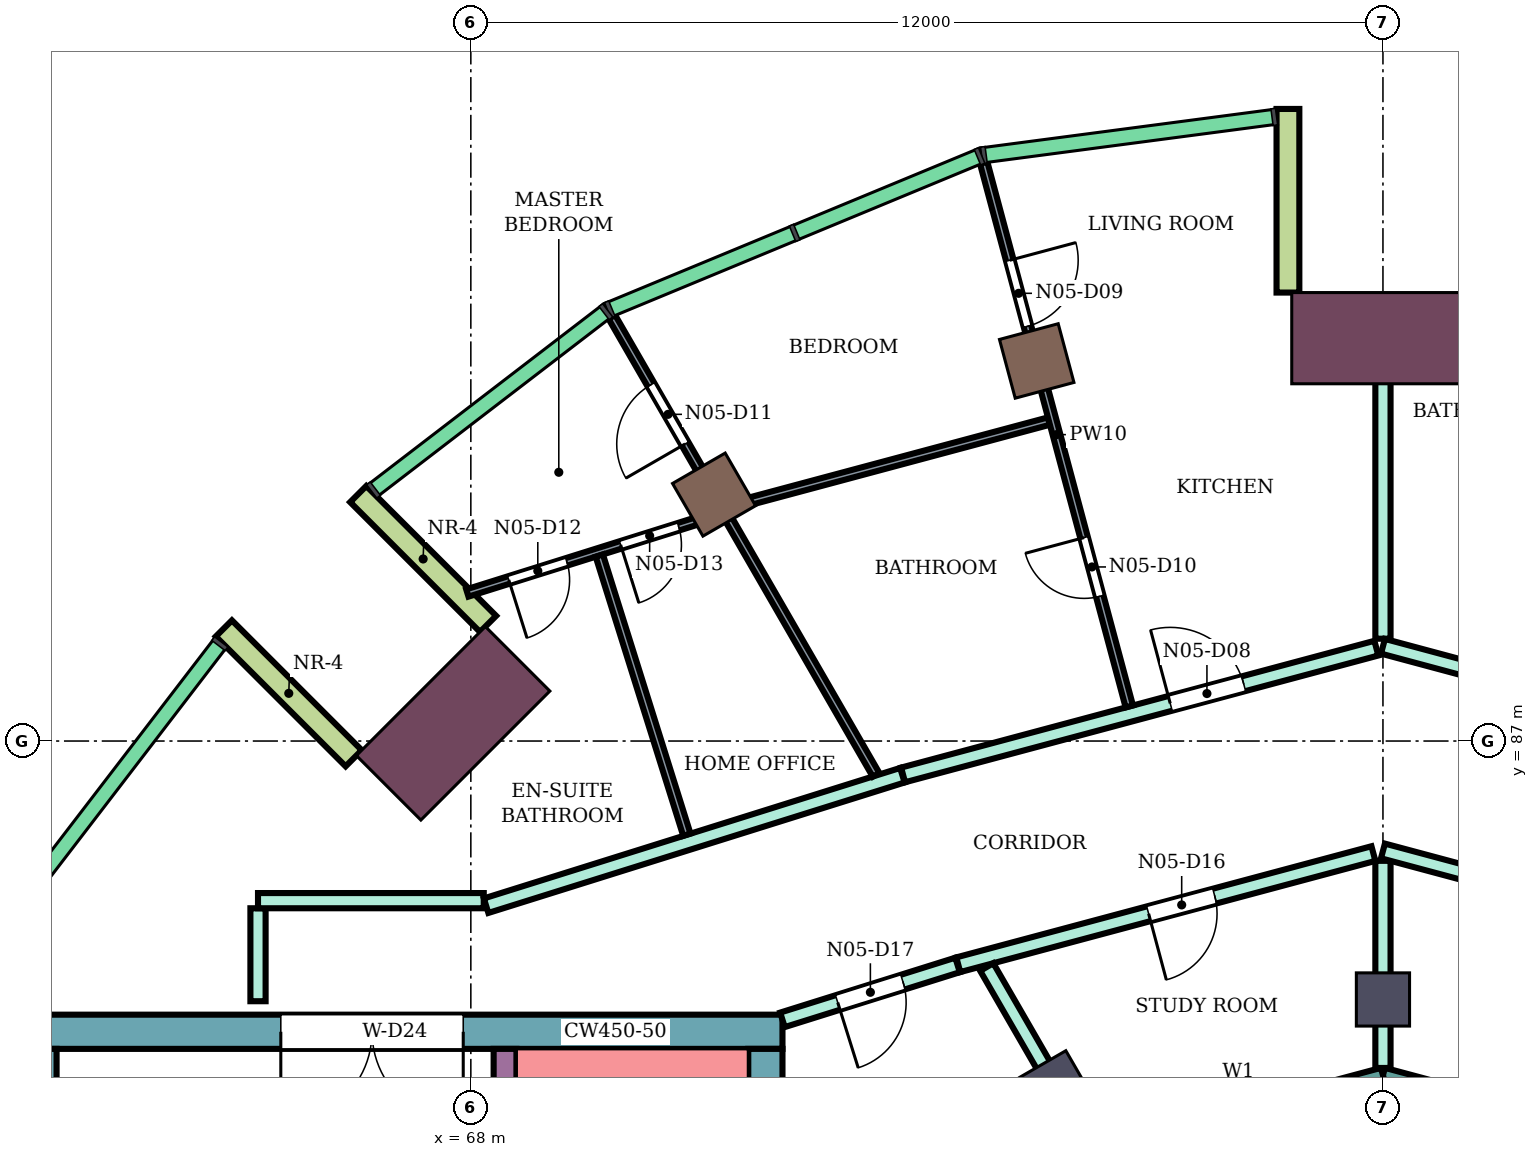
"""IFC4 building model, lengths in metres.
Left out: names, types, materials, properties, quantities, classifications, styles, units other than length and angle.
Written with IfcOpenShell. Run it as: python <this file> out.ifc"""

import sys

from ifc_helpers import new_model, si_unit, direction, frame, frame_2d, origin, origin_2d, place, context, subcontext, project, spatial, rectangle, extrude, element, fill, save


model = new_model("IFC4")
c1 = context("Model", 3, precision=1e-05, world=origin(), true_north=direction((0.0, 1.0)))
c2 = subcontext(c1, "Body", "Model", "MODEL_VIEW")
j1 = project(units=[si_unit("LENGTHUNIT", "METRE"), si_unit("PLANEANGLEUNIT", "RADIAN")], contexts=[c1])
p1 = place(None, origin())
s1 = spatial("IfcSite", under=j1, at=p1, CompositionType="ELEMENT")
p2 = place(p1, origin())
s2 = spatial("IfcBuilding", under=s1, at=p2, CompositionType="ELEMENT")
p3 = place(p2, frame((0.0, 0.0, 319.3)))
s3 = spatial("IfcBuildingStorey", under=s2, at=p3, CompositionType="ELEMENT", Elevation=319.3)
for number, where, z_axis, x_axis in (
    (1, (75.445, 92.0, 0.0), (0.0, 0.0, 1.0), (-0.259, 0.966, 0.0)),
    (2, (71.2, 90.242, 0.0), (0.0, 0.0, 1.0), (-0.5, 0.866, 0.0)),
):
    element("IfcColumn", number, at=place(p3, frame(where, z_axis=z_axis, x_axis=x_axis)), inside=s3, PredefinedType="COLUMN", context=c2, shape_type="SweptSolid", body=[
        extrude(rectangle(XDim=0.8, YDim=0.8, at=origin_2d()), origin(), (0.0, 0.0, 1.0), 4.4),
    ])
for number, where, z_axis, x_axis in (
    (3, (80.0, 83.6, 0.0), (0.0, 0.0, 1.0), (0.0, 1.0, 0.0)),
    (4, (75.7, 82.448, 0.0), (0.0, 0.0, 1.0), (-0.5, 0.866, 0.0)),
):
    element("IfcColumn", number, at=place(p3, frame(where, z_axis=z_axis, x_axis=x_axis)), inside=s3, PredefinedType="COLUMN", context=c2, shape_type="SweptSolid", body=[
        extrude(rectangle(XDim=0.7, YDim=0.7, at=origin_2d()), origin(), (0.0, 0.0, 1.0), 4.4),
    ])
for number, where, z_axis, x_axis in (
    (5, (80.0, 92.3, 0.0), (0.0, 0.0, 1.0), (0.0, 1.0, 0.0)),
    (6, (67.767, 87.233, 0.0), (0.0, 0.0, 1.0), (-0.707, 0.707, 0.0)),
):
    element("IfcColumn", number, at=place(p3, frame(where, z_axis=z_axis, x_axis=x_axis)), inside=s3, PredefinedType="COLUMN", context=c2, shape_type="SweptSolid", body=[
        extrude(rectangle(XDim=1.2, YDim=2.4, at=origin_2d()), origin(), (0.0, 0.0, 1.0), 4.4),
    ])
p4 = place(p3, frame((72.1, 83.175, 0.0), z_axis=(0.0, 0.0, 1.0), x_axis=(-1.0, 0.0, 0.0)))
e7 = element("IfcWall", 7, at=p4, inside=s3, PredefinedType="SHEAR", context=c2, shape_type="SweptSolid", body=[
    extrude(rectangle(XDim=10.0, YDim=0.45, at=frame_2d((5.0, 0.0))), origin(), (0.0, 0.0, 1.0), 4.08),
])
p5 = place(p4, frame((4.2, 0.0, 0.0)))
e8 = element("IfcOpeningElement", 8, at=p5, cuts=e7, PredefinedType="OPENING", context=c2, shape_type="SweptSolid", body=[
    extrude(rectangle(XDim=2.4, YDim=2.4, at=frame_2d((1.2, 1.2))), frame((0.0, 0.235, 0.0), z_axis=(0.0, -1.0, 0.0), x_axis=(1.0, 0.0, 0.0)), (0.0, 0.0, 1.0), 0.47),
])
p6 = place(p3, frame((71.875, 82.95, 0.0), z_axis=(0.0, 0.0, 1.0), x_axis=(0.0, -1.0, 0.0)))
e9 = element("IfcWall", 9, at=p6, inside=s3, PredefinedType="SHEAR", context=c2, shape_type="SweptSolid", body=[
    extrude(rectangle(XDim=7.95, YDim=0.45, at=frame_2d((3.975, 0.0))), origin(), (0.0, 0.0, 1.0), 4.08),
])
p7 = place(p3, frame((62.325, 82.95, 0.0), z_axis=(0.0, 0.0, 1.0), x_axis=(0.0, -1.0, 0.0)))
e10 = element("IfcWall", 10, at=p7, inside=s3, PredefinedType="SHEAR", context=c2, shape_type="SweptSolid", body=[
    extrude(rectangle(XDim=3.7, YDim=0.45, at=frame_2d((1.85, 0.0))), origin(), (0.0, 0.0, 1.0), 4.08),
])
p8 = place(p3, frame((68.45, 82.95, 0.0), z_axis=(0.0, 0.0, 1.0), x_axis=(0.0, -1.0, 0.0)))
e11 = element("IfcWall", 11, at=p8, inside=s3, PredefinedType="SHEAR", context=c2, shape_type="SweptSolid", body=[
    extrude(rectangle(XDim=7.95, YDim=0.3, at=frame_2d((3.975, 0.0))), origin(), (0.0, 0.0, 1.0), 4.08),
])
p9 = place(p8, frame((0.6, 0.0, 0.0)))
e12 = element("IfcOpeningElement", 12, at=p9, cuts=e11, PredefinedType="OPENING", context=c2, shape_type="SweptSolid", body=[
    extrude(rectangle(XDim=0.9, YDim=2.1, at=frame_2d((0.45, 1.05))), frame((0.0, 0.16, 0.0), z_axis=(0.0, -1.0, 0.0), x_axis=(1.0, 0.0, 0.0)), (0.0, 0.0, 1.0), 0.32),
])
for number, where, z_axis, x_axis in (
    (13, (78.75, 92.9, 0.0), (0.0, 0.0, 1.0), (0.0, 1.0, 0.0)),
    (14, (68.227, 88.541, 0.0), (0.0, 0.0, 1.0), (-0.707, 0.707, 0.0)),
    (15, (66.459, 86.773, 0.0), (0.0, 0.0, 1.0), (-0.707, 0.707, 0.0)),
):
    element("IfcWall", number, at=place(p3, frame(where, z_axis=z_axis, x_axis=x_axis)), inside=s3, PredefinedType="NOTDEFINED", context=c2, shape_type="SweptSolid", body=[
        extrude(rectangle(XDim=2.416, YDim=0.3, at=frame_2d((1.208, 0.0))), origin(), (0.0, 0.0, 1.0), 4.4),
    ])
p10 = place(p3, frame((83.802, 81.585, 0.0), z_axis=(0.0, 0.0, 1.0), x_axis=(-0.965933654434, 0.258789828301, 0.0)))
e16 = element("IfcWall", 16, at=p10, inside=s3, PredefinedType="NOTDEFINED", context=c2, shape_type="SweptSolid", body=[
    extrude(rectangle(XDim=3.936, YDim=0.2, at=frame_2d((1.968, 0.0))), origin(), (0.0, 0.0, 1.0), 4.4),
])
p11 = place(p10, frame((0.468, 0.0, 0.9)))
e17 = element("IfcOpeningElement", 17, at=p11, cuts=e16, PredefinedType="OPENING", context=c2, shape_type="SweptSolid", body=[
    extrude(rectangle(XDim=3.0, YDim=2.3, at=frame_2d((1.5, 1.15))), frame((0.0, 0.11, 0.0), z_axis=(0.0, -1.0, 0.0), x_axis=(1.0, 0.0, 0.0)), (0.0, 0.0, 1.0), 0.22),
])
p12 = place(p3, frame((80.0, 82.604, 0.0), z_axis=(0.0, 0.0, 1.0), x_axis=(-0.965933654434, -0.258789828301, 0.0)))
e18 = element("IfcWall", 18, at=p12, inside=s3, PredefinedType="NOTDEFINED", context=c2, shape_type="SweptSolid", body=[
    extrude(rectangle(XDim=3.936, YDim=0.2, at=frame_2d((1.968, 0.0))), origin(), (0.0, 0.0, 1.0), 4.4),
])
p13 = place(p12, frame((0.468, 0.0, 0.9)))
e19 = element("IfcOpeningElement", 19, at=p13, cuts=e18, PredefinedType="OPENING", context=c2, shape_type="SweptSolid", body=[
    extrude(rectangle(XDim=3.0, YDim=2.3, at=frame_2d((1.5, 1.15))), frame((0.0, 0.11, 0.0), z_axis=(0.0, -1.0, 0.0), x_axis=(1.0, 0.0, 0.0)), (0.0, 0.0, 1.0), 0.22),
])
p14 = place(p3, frame((65.2, 83.577, 0.0), z_axis=(0.0, 0.0, 1.0), x_axis=(0.0, 1.0, 0.0)))
e20 = element("IfcWall", 20, at=p14, inside=s3, PredefinedType="PARTITIONING", context=c2, shape_type="SweptSolid", body=[
    extrude(rectangle(XDim=1.223, YDim=0.2, at=frame_2d((0.612, 0.0))), origin(), (0.0, 0.0, 1.0), 3.95),
])
p15 = place(p3, frame((65.2, 84.9, 0.0), z_axis=(0.0, 0.0, 1.0), x_axis=(1.0, 0.0, 0.0)))
e21 = element("IfcWall", 21, at=p15, inside=s3, PredefinedType="PARTITIONING", context=c2, shape_type="SweptSolid", body=[
    extrude(rectangle(XDim=2.97, YDim=0.2, at=frame_2d((1.485, 0.0))), origin(), (0.0, 0.0, 1.0), 3.95),
])
p16 = place(p3, frame((68.201, 84.834, 0.0), z_axis=(0.0, 0.0, 1.0), x_axis=(0.954232917497, 0.29906443982, 0.0)))
e22 = element("IfcWall", 22, at=p16, inside=s3, PredefinedType="PARTITIONING", context=c2, shape_type="SweptSolid", body=[
    extrude(rectangle(XDim=5.74, YDim=0.2, at=frame_2d((2.87, 0.0))), origin(), (0.0, 0.0, 1.0), 3.95),
])
p17 = place(p3, frame((72.1, 83.332, 0.0), z_axis=(0.0, 0.0, 1.0), x_axis=(0.954233106619, 0.299063836383, 0.0)))
e23 = element("IfcWall", 23, at=p17, inside=s3, PredefinedType="PARTITIONING", context=c2, shape_type="SweptSolid", body=[
    extrude(rectangle(XDim=2.414, YDim=0.2, at=frame_2d((1.207, 0.0))), origin(), (0.0, 0.0, 1.0), 3.95),
])
p18 = place(p17, frame((0.762, 0.0, 0.0)))
e24 = element("IfcOpeningElement", 24, at=p18, cuts=e23, PredefinedType="OPENING", context=c2, shape_type="SweptSolid", body=[
    extrude(rectangle(XDim=0.9, YDim=2.1, at=frame_2d((0.45, 1.05))), frame((0.0, 0.11, 0.0), z_axis=(0.0, -1.0, 0.0), x_axis=(1.0, 0.0, 0.0)), (0.0, 0.0, 1.0), 0.22),
])
p19 = place(p3, frame((73.687, 86.554, 0.0), z_axis=(0.0, 0.0, 1.0), x_axis=(0.96595903825, 0.258695064551, 0.0)))
e25 = element("IfcWall", 25, at=p19, inside=s3, PredefinedType="PARTITIONING", context=c2, shape_type="SweptSolid", body=[
    extrude(rectangle(XDim=6.446, YDim=0.2, at=frame_2d((3.223, 0.0))), origin(), (0.0, 0.0, 1.0), 3.95),
])
p20 = place(p19, frame((3.638, 0.0, 0.0)))
e26 = element("IfcOpeningElement", 26, at=p20, cuts=e25, PredefinedType="OPENING", context=c2, shape_type="SweptSolid", body=[
    extrude(rectangle(XDim=1.0, YDim=2.1, at=frame_2d((0.5, 1.05))), frame((0.0, 0.11, 0.0), z_axis=(0.0, -1.0, 0.0), x_axis=(1.0, 0.0, 0.0)), (0.0, 0.0, 1.0), 0.22),
])
p21 = place(p3, frame((74.413, 84.057, 0.0), z_axis=(0.0, 0.0, 1.0), x_axis=(0.965972135939, 0.258646153246, 0.0)))
e27 = element("IfcWall", 27, at=p21, inside=s3, PredefinedType="PARTITIONING", context=c2, shape_type="SweptSolid", body=[
    extrude(rectangle(XDim=5.654, YDim=0.2, at=frame_2d((2.827, 0.0))), origin(), (0.0, 0.0, 1.0), 3.95),
])
p22 = place(p21, frame((2.593, 0.0, 0.0)))
e28 = element("IfcOpeningElement", 28, at=p22, cuts=e27, PredefinedType="OPENING", context=c2, shape_type="SweptSolid", body=[
    extrude(rectangle(XDim=0.9, YDim=2.1, at=frame_2d((0.45, 1.05))), frame((0.0, 0.11, 0.0), z_axis=(0.0, -1.0, 0.0), x_axis=(1.0, 0.0, 0.0)), (0.0, 0.0, 1.0), 0.22),
])
p23 = place(p3, frame((74.787, 84.027, 0.0), z_axis=(0.0, 0.0, 1.0), x_axis=(0.500079107518, -0.86597972622, 0.0)))
e29 = element("IfcWall", 29, at=p23, inside=s3, PredefinedType="PARTITIONING", context=c2, shape_type="SweptSolid", body=[
    extrude(rectangle(XDim=2.726, YDim=0.2, at=frame_2d((1.363, 0.0))), origin(), (0.0, 0.0, 1.0), 3.95),
])
p24 = place(p3, frame((80.0, 82.699, 0.0), z_axis=(0.0, 0.0, 1.0), x_axis=(0.0, 1.0, 0.0)))
e30 = element("IfcWall", 30, at=p24, inside=s3, PredefinedType="PARTITIONING", context=c2, shape_type="SweptSolid", body=[
    extrude(rectangle(XDim=2.725, YDim=0.2, at=frame_2d((1.363, 0.0))), origin(), (0.0, 0.0, 1.0), 3.95),
])
p25 = place(p3, frame((80.0, 85.554, 0.0), z_axis=(0.0, 0.0, 1.0), x_axis=(0.965928989968, -0.258807237802, 0.0)))
e31 = element("IfcWall", 31, at=p25, inside=s3, PredefinedType="PARTITIONING", context=c2, shape_type="SweptSolid", body=[
    extrude(rectangle(XDim=5.774, YDim=0.2, at=frame_2d((2.887, 0.0))), origin(), (0.0, 0.0, 1.0), 3.95),
])
p26 = place(p25, frame((2.292, 0.0, 0.0)))
e32 = element("IfcOpeningElement", 32, at=p26, cuts=e31, PredefinedType="OPENING", context=c2, shape_type="SweptSolid", body=[
    extrude(rectangle(XDim=0.9, YDim=2.1, at=frame_2d((0.45, 1.05))), frame((0.0, 0.11, 0.0), z_axis=(0.0, -1.0, 0.0), x_axis=(1.0, 0.0, 0.0)), (0.0, 0.0, 1.0), 0.22),
])
p27 = place(p3, frame((80.0, 88.346, 0.0), z_axis=(0.0, 0.0, 1.0), x_axis=(0.0, 1.0, 0.0)))
e33 = element("IfcWall", 33, at=p27, inside=s3, PredefinedType="PARTITIONING", context=c2, shape_type="SweptSolid", body=[
    extrude(rectangle(XDim=4.354, YDim=0.2, at=frame_2d((2.177, 0.0))), origin(), (0.0, 0.0, 1.0), 3.95),
])
p28 = place(p3, frame((80.0, 88.247, 0.0), z_axis=(0.0, 0.0, 1.0), x_axis=(0.965807659316, -0.259259648244, 0.0)))
e34 = element("IfcWall", 34, at=p28, inside=s3, PredefinedType="PARTITIONING", context=c2, shape_type="SweptSolid", body=[
    extrude(rectangle(XDim=6.526, YDim=0.2, at=frame_2d((3.263, 0.0))), origin(), (0.0, 0.0, 1.0), 3.95),
])
p29 = place(p28, frame((1.93, 0.0, 0.0)))
e35 = element("IfcOpeningElement", 35, at=p29, cuts=e34, PredefinedType="OPENING", context=c2, shape_type="SweptSolid", body=[
    extrude(rectangle(XDim=1.0, YDim=2.1, at=frame_2d((0.5, 1.05))), frame((0.0, 0.11, 0.0), z_axis=(0.0, -1.0, 0.0), x_axis=(1.0, 0.0, 0.0)), (0.0, 0.0, 1.0), 0.22),
])
p30 = place(p3, frame((67.954, 88.948, 0.0), z_axis=(0.0, 0.0, 1.0), x_axis=(0.954122535632, 0.299416410704, 0.0)))
e36 = element("IfcWall", 36, at=p30, inside=s3, PredefinedType="PARTITIONING", context=c2, shape_type="SweptSolid", body=[
    extrude(rectangle(XDim=3.482, YDim=0.1, at=frame_2d((1.741, 0.0))), origin(), (0.0, 0.0, 1.0), 3.95),
])
p31 = place(p30, frame((0.571, 0.0, 0.0)))
e37 = element("IfcOpeningElement", 37, at=p31, cuts=e36, PredefinedType="OPENING", context=c2, shape_type="SweptSolid", body=[
    extrude(rectangle(XDim=0.8, YDim=2.1, at=frame_2d((0.4, 1.05))), frame((0.0, 0.06, 0.0), z_axis=(0.0, -1.0, 0.0), x_axis=(1.0, 0.0, 0.0)), (0.0, 0.0, 1.0), 0.12),
])
p32 = place(p30, frame((2.114, 0.0, 0.0)))
e38 = element("IfcOpeningElement", 38, at=p32, cuts=e36, PredefinedType="OPENING", context=c2, shape_type="SweptSolid", body=[
    extrude(rectangle(XDim=0.8, YDim=2.1, at=frame_2d((0.4, 1.05))), frame((0.0, 0.06, 0.0), z_axis=(0.0, -1.0, 0.0), x_axis=(1.0, 0.0, 0.0)), (0.0, 0.0, 1.0), 0.12),
])
p33 = place(p3, frame((69.69, 89.44, 0.0), z_axis=(0.0, 0.0, 1.0), x_axis=(0.299260814267, -0.954171349939, 0.0)))
e39 = element("IfcWall", 39, at=p33, inside=s3, PredefinedType="PARTITIONING", context=c2, shape_type="SweptSolid", body=[
    extrude(rectangle(XDim=3.849, YDim=0.1, at=frame_2d((1.925, 0.0))), origin(), (0.0, 0.0, 1.0), 3.95),
])
p34 = place(p3, frame((69.855, 92.579, 0.0), z_axis=(0.0, 0.0, 1.0), x_axis=(0.499801463163, -0.866139998742, 0.0)))
e40 = element("IfcWall", 40, at=p34, inside=s3, PredefinedType="PARTITIONING", context=c2, shape_type="SweptSolid", body=[
    extrude(rectangle(XDim=6.955, YDim=0.1, at=frame_2d((3.478, 0.0))), origin(), (0.0, 0.0, 1.0), 3.95),
])
p35 = place(p34, frame((1.029, 0.0, 0.0)))
e41 = element("IfcOpeningElement", 41, at=p35, cuts=e40, PredefinedType="OPENING", context=c2, shape_type="SweptSolid", body=[
    extrude(rectangle(XDim=0.9, YDim=2.1, at=frame_2d((0.45, 1.05))), frame((0.0, 0.06, 0.0), z_axis=(0.0, -1.0, 0.0), x_axis=(1.0, 0.0, 0.0)), (0.0, 0.0, 1.0), 0.12),
])
p36 = place(p3, frame((71.375, 90.075, 0.0), z_axis=(0.0, 0.0, 1.0), x_axis=(0.965918685896, 0.258845691944, 0.0)))
e42 = element("IfcWall", 42, at=p36, inside=s3, PredefinedType="PARTITIONING", context=c2, shape_type="SweptSolid", body=[
    extrude(rectangle(XDim=4.379, YDim=0.1, at=frame_2d((2.189, 0.0))), origin(), (0.0, 0.0, 1.0), 3.95),
])
p37 = place(p3, frame((74.747, 94.607, 0.0), z_axis=(0.0, 0.0, 1.0), x_axis=(0.258787180783, -0.965934363745, 0.0)))
e43 = element("IfcWall", 43, at=p37, inside=s3, PredefinedType="PARTITIONING", context=c2, shape_type="SweptSolid", body=[
    extrude(rectangle(XDim=7.404, YDim=0.1, at=frame_2d((3.702, 0.0))), origin(), (0.0, 0.0, 1.0), 3.95),
])
p38 = place(p37, frame((1.327, 0.0, 0.0)))
e44 = element("IfcOpeningElement", 44, at=p38, cuts=e43, PredefinedType="OPENING", context=c2, shape_type="SweptSolid", body=[
    extrude(rectangle(XDim=0.9, YDim=2.1, at=frame_2d((0.45, 1.05))), frame((0.0, 0.06, 0.0), z_axis=(0.0, -1.0, 0.0), x_axis=(1.0, 0.0, 0.0)), (0.0, 0.0, 1.0), 0.12),
])
p39 = place(p37, frame((5.104, 0.0, 0.0)))
e45 = element("IfcOpeningElement", 45, at=p39, cuts=e43, PredefinedType="OPENING", context=c2, shape_type="SweptSolid", body=[
    extrude(rectangle(XDim=0.8, YDim=2.1, at=frame_2d((0.4, 1.05))), frame((0.0, 0.06, 0.0), z_axis=(0.0, -1.0, 0.0), x_axis=(1.0, 0.0, 0.0)), (0.0, 0.0, 1.0), 0.12),
])
p40 = place(p3, frame((80.106, 92.359, 0.0), z_axis=(0.0, 0.0, 1.0), x_axis=(0.965889909151, -0.258953052501, 0.0)))
e46 = element("IfcWall", 46, at=p40, inside=s3, PredefinedType="PARTITIONING", context=c2, shape_type="SweptSolid", body=[
    extrude(rectangle(XDim=8.83, YDim=0.1, at=frame_2d((4.415, 0.0))), origin(), (0.0, 0.0, 1.0), 3.28),
])
p41 = place(p40, frame((3.076, 0.0, 0.0)))
e47 = element("IfcOpeningElement", 47, at=p41, cuts=e46, PredefinedType="OPENING", context=c2, shape_type="SweptSolid", body=[
    extrude(rectangle(XDim=0.9, YDim=2.1, at=frame_2d((0.45, 1.05))), frame((0.0, 0.06, 0.0), z_axis=(0.0, -1.0, 0.0), x_axis=(1.0, 0.0, 0.0)), (0.0, 0.0, 1.0), 0.12),
])
p42 = place(p20, origin())
e48 = element("IfcDoor", 48, at=p42, inside=s3, OperationType="SINGLE_SWING_LEFT", PredefinedType="DOOR", context=c2, shape_type="SweptSolid", body=[
    extrude(rectangle(XDim=1.0, YDim=2.1, at=frame_2d((0.5, 1.05))), frame((0.0, 0.025, 0.0), z_axis=(0.0, -1.0, 0.0), x_axis=(1.0, 0.0, 0.0)), (0.0, 0.0, 1.0), 0.05),
])
fill(e26, e48)
p43 = place(p38, origin())
e49 = element("IfcDoor", 49, at=p43, inside=s3, OperationType="SINGLE_SWING_LEFT", PredefinedType="DOOR", context=c2, shape_type="SweptSolid", body=[
    extrude(rectangle(XDim=0.9, YDim=2.1, at=frame_2d((0.45, 1.05))), frame((0.0, 0.025, 0.0), z_axis=(0.0, -1.0, 0.0), x_axis=(1.0, 0.0, 0.0)), (0.0, 0.0, 1.0), 0.05),
])
fill(e44, e49)
p44 = place(p39, frame((0.8, 0.0, 0.0), z_axis=(0.0, 0.0, 1.0), x_axis=(-1.0, 0.0, 0.0)))
e50 = element("IfcDoor", 50, at=p44, inside=s3, OperationType="SINGLE_SWING_RIGHT", PredefinedType="DOOR", context=c2, shape_type="SweptSolid", body=[
    extrude(rectangle(XDim=0.8, YDim=2.1, at=frame_2d((0.4, 1.05))), frame((0.0, 0.025, 0.0), z_axis=(0.0, -1.0, 0.0), x_axis=(1.0, 0.0, 0.0)), (0.0, 0.0, 1.0), 0.05),
])
fill(e45, e50)
p45 = place(p35, frame((0.9, 0.0, 0.0), z_axis=(0.0, 0.0, 1.0), x_axis=(-1.0, 0.0, 0.0)))
e51 = element("IfcDoor", 51, at=p45, inside=s3, OperationType="SINGLE_SWING_LEFT", PredefinedType="DOOR", context=c2, shape_type="SweptSolid", body=[
    extrude(rectangle(XDim=0.9, YDim=2.1, at=frame_2d((0.45, 1.05))), frame((0.0, 0.025, 0.0), z_axis=(0.0, -1.0, 0.0), x_axis=(1.0, 0.0, 0.0)), (0.0, 0.0, 1.0), 0.05),
])
fill(e41, e51)
p46 = place(p31, frame((0.8, 0.0, 0.0), z_axis=(0.0, 0.0, 1.0), x_axis=(-1.0, 0.0, 0.0)))
e52 = element("IfcDoor", 52, at=p46, inside=s3, OperationType="SINGLE_SWING_RIGHT", PredefinedType="DOOR", context=c2, shape_type="SweptSolid", body=[
    extrude(rectangle(XDim=0.8, YDim=2.1, at=frame_2d((0.4, 1.05))), frame((0.0, 0.025, 0.0), z_axis=(0.0, -1.0, 0.0), x_axis=(1.0, 0.0, 0.0)), (0.0, 0.0, 1.0), 0.05),
])
fill(e37, e52)
p47 = place(p32, frame((0.8, 0.0, 0.0), z_axis=(0.0, 0.0, 1.0), x_axis=(-1.0, 0.0, 0.0)))
e53 = element("IfcDoor", 53, at=p47, inside=s3, OperationType="SINGLE_SWING_RIGHT", PredefinedType="DOOR", context=c2, shape_type="SweptSolid", body=[
    extrude(rectangle(XDim=0.8, YDim=2.1, at=frame_2d((0.4, 1.05))), frame((0.0, 0.025, 0.0), z_axis=(0.0, -1.0, 0.0), x_axis=(1.0, 0.0, 0.0)), (0.0, 0.0, 1.0), 0.05),
])
fill(e38, e53)
p48 = place(p22, frame((0.9, 0.0, 0.0), z_axis=(0.0, 0.0, 1.0), x_axis=(-1.0, 0.0, 0.0)))
e54 = element("IfcDoor", 54, at=p48, inside=s3, OperationType="SINGLE_SWING_RIGHT", PredefinedType="DOOR", context=c2, shape_type="SweptSolid", body=[
    extrude(rectangle(XDim=0.9, YDim=2.1, at=frame_2d((0.45, 1.05))), frame((0.0, 0.025, 0.0), z_axis=(0.0, -1.0, 0.0), x_axis=(1.0, 0.0, 0.0)), (0.0, 0.0, 1.0), 0.05),
])
fill(e28, e54)
p49 = place(p18, frame((0.9, 0.0, 0.0), z_axis=(0.0, 0.0, 1.0), x_axis=(-1.0, 0.0, 0.0)))
e55 = element("IfcDoor", 55, at=p49, inside=s3, OperationType="SINGLE_SWING_RIGHT", PredefinedType="DOOR", context=c2, shape_type="SweptSolid", body=[
    extrude(rectangle(XDim=0.9, YDim=2.1, at=frame_2d((0.45, 1.05))), frame((0.0, 0.025, 0.0), z_axis=(0.0, -1.0, 0.0), x_axis=(1.0, 0.0, 0.0)), (0.0, 0.0, 1.0), 0.05),
])
fill(e24, e55)
p50 = place(p5, origin())
e56 = element("IfcDoor", 56, at=p50, inside=s3, OperationType="DOUBLE_DOOR_SINGLE_SWING", PredefinedType="DOOR", context=c2, shape_type="SweptSolid", body=[
    extrude(rectangle(XDim=2.4, YDim=2.4, at=frame_2d((1.2, 1.2))), frame((0.0, 0.025, 0.0), z_axis=(0.0, -1.0, 0.0), x_axis=(1.0, 0.0, 0.0)), (0.0, 0.0, 1.0), 0.05),
])
fill(e8, e56)
save(model, sys.argv[1])
